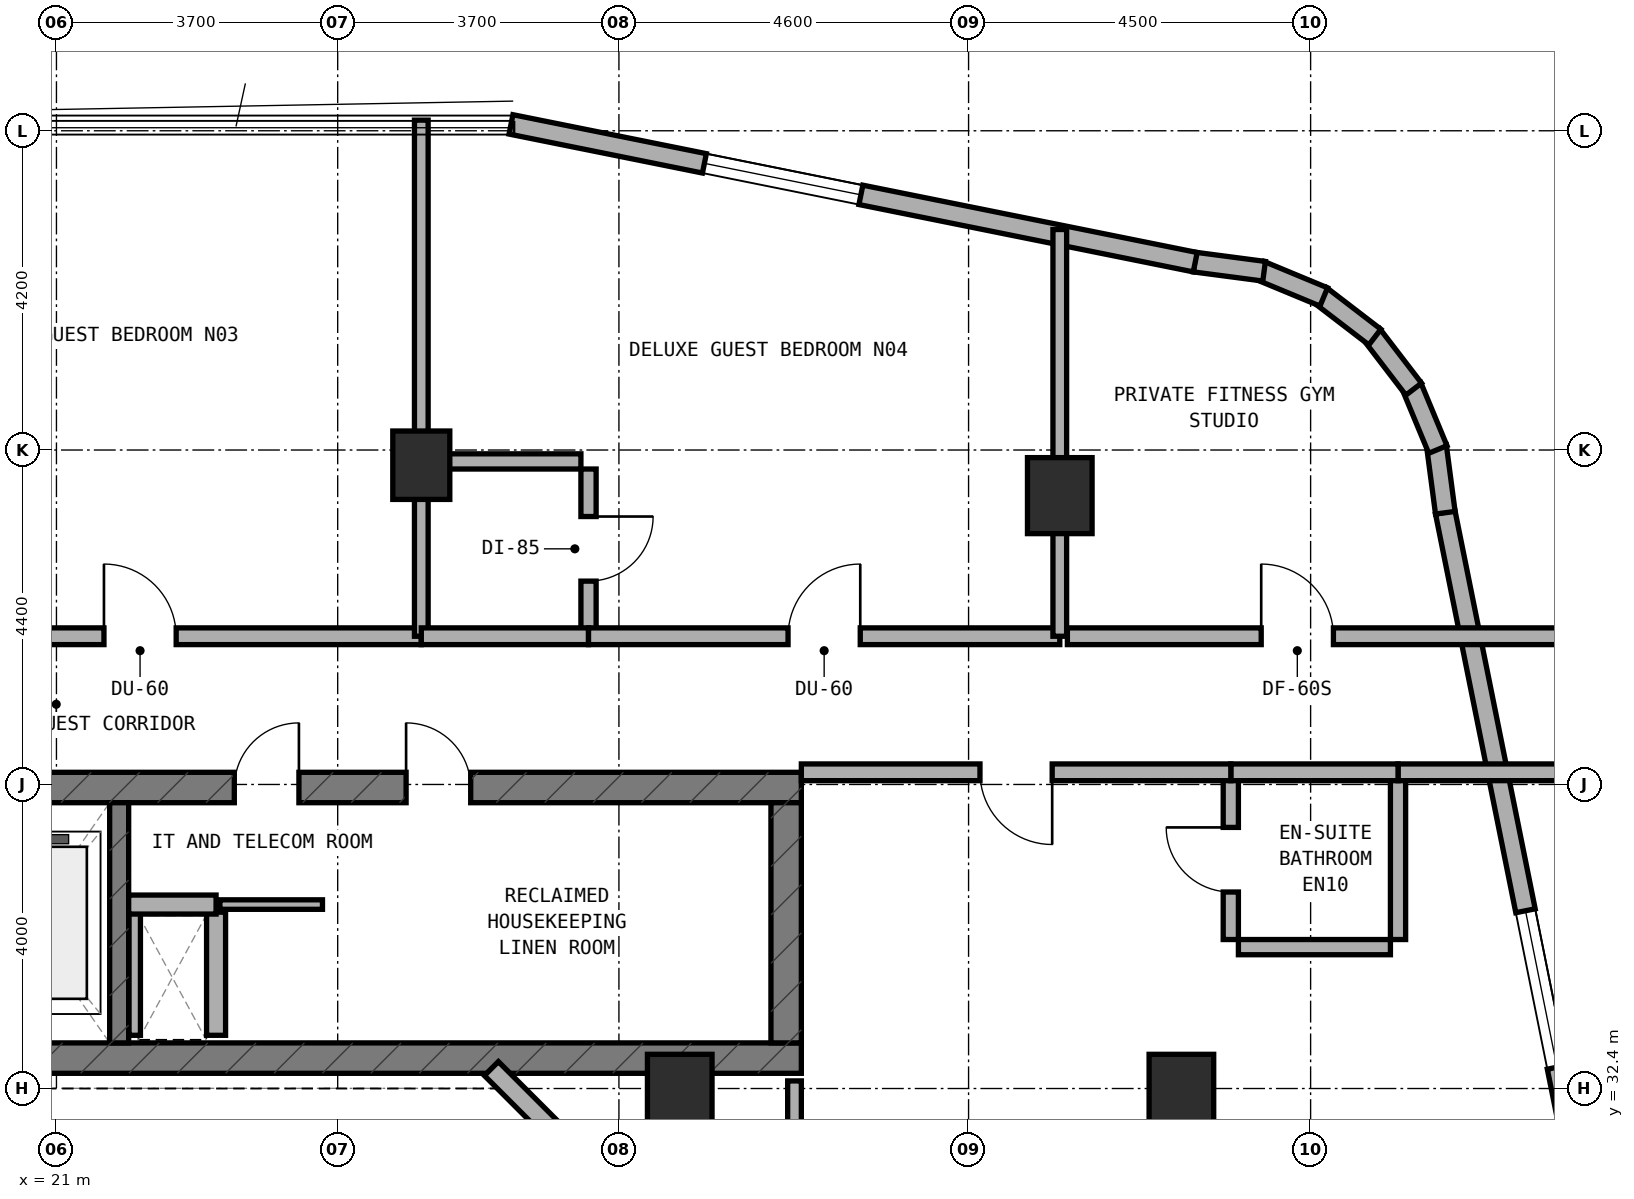
"""IFC4 building model, lengths in metres.
Left out: names, types, materials, properties, quantities, classifications, styles, units other than length and angle.
Written with IfcOpenShell. Run it as: python <this file> out.ifc"""

import sys

from ifc_helpers import new_model, si_unit, direction, frame, frame_2d, origin, origin_2d, place, context, subcontext, project, spatial, rectangle, extrude, element, fill, save


model = new_model("IFC4")
c1 = context("Model", 3, precision=1e-05, world=origin(), true_north=direction((0.0, 1.0)))
c2 = subcontext(c1, "Body", "Model", "MODEL_VIEW")
j1 = project(units=[si_unit("LENGTHUNIT", "METRE"), si_unit("PLANEANGLEUNIT", "RADIAN")], contexts=[c1])
p1 = place(None, origin())
s1 = spatial("IfcSite", under=j1, at=p1, CompositionType="ELEMENT")
p2 = place(p1, origin())
s2 = spatial("IfcBuilding", under=s1, at=p2, CompositionType="ELEMENT")
p3 = place(p2, frame((0.0, 0.0, 152.0)))
s3 = spatial("IfcBuildingStorey", under=s2, at=p3, CompositionType="ELEMENT", Elevation=152.0)
p4 = place(p3, frame((6.4, 32.8, 0.0), z_axis=(0.0, 0.0, 1.0), x_axis=(1.0, 0.0, 0.0)))
e1 = element("IfcWall", 1, at=p4, inside=s3, PredefinedType="SHEAR", context=c2, shape_type="SweptSolid", body=[
    extrude(rectangle(XDim=24.4, YDim=0.4, at=frame_2d((12.2, 0.0))), origin(), (0.0, 0.0, 1.0), 3.5),
])
p5 = place(p4, frame((6.05, 0.0, 0.0)))
e2 = element("IfcOpeningElement", 2, at=p5, cuts=e1, PredefinedType="OPENING", context=c2, shape_type="SweptSolid", body=[
    extrude(rectangle(XDim=1.1, YDim=2.15, at=frame_2d((0.55, 1.075))), frame((0.0, 0.21, 0.0), z_axis=(0.0, -1.0, 0.0), x_axis=(1.0, 0.0, 0.0)), (0.0, 0.0, 1.0), 0.42),
])
p6 = place(p3, frame((6.4, 36.36, 0.0), z_axis=(0.0, 0.0, 1.0), x_axis=(1.0, 0.0, 0.0)))
e3 = element("IfcWall", 3, at=p6, inside=s3, PredefinedType="SHEAR", context=c2, shape_type="SweptSolid", body=[
    extrude(rectangle(XDim=24.4, YDim=0.4, at=frame_2d((12.2, 0.0))), origin(), (0.0, 0.0, 1.0), 3.5),
])
p7 = place(p6, frame((9.15, 0.0, 0.0)))
e4 = element("IfcOpeningElement", 4, at=p7, cuts=e3, PredefinedType="OPENING", context=c2, shape_type="SweptSolid", body=[
    extrude(rectangle(XDim=1.2, YDim=2.15, at=frame_2d((0.6, 1.075))), frame((0.0, 0.21, 0.0), z_axis=(0.0, -1.0, 0.0), x_axis=(1.0, 0.0, 0.0)), (0.0, 0.0, 1.0), 0.42),
])
p8 = place(p6, frame((19.2, 0.0, 0.0)))
e5 = element("IfcOpeningElement", 5, at=p8, cuts=e3, PredefinedType="OPENING", context=c2, shape_type="SweptSolid", body=[
    extrude(rectangle(XDim=0.85, YDim=2.1, at=frame_2d((0.425, 1.05))), frame((0.0, 0.21, 0.0), z_axis=(0.0, -1.0, 0.0), x_axis=(1.0, 0.0, 0.0)), (0.0, 0.0, 1.0), 0.42),
])
p9 = place(p6, frame((16.94, 0.0, 0.0)))
e6 = element("IfcOpeningElement", 6, at=p9, cuts=e3, PredefinedType="OPENING", context=c2, shape_type="SweptSolid", body=[
    extrude(rectangle(XDim=0.85, YDim=2.1, at=frame_2d((0.425, 1.05))), frame((0.0, 0.21, 0.0), z_axis=(0.0, -1.0, 0.0), x_axis=(1.0, 0.0, 0.0)), (0.0, 0.0, 1.0), 0.42),
])
p10 = place(p3, frame((30.6, 33.0, 0.0), z_axis=(0.0, 0.0, 1.0), x_axis=(0.0, 1.0, 0.0)))
e7 = element("IfcWall", 7, at=p10, inside=s3, PredefinedType="SHEAR", context=c2, shape_type="SweptSolid", body=[
    extrude(rectangle(XDim=3.16, YDim=0.4, at=frame_2d((1.58, 0.0))), origin(), (0.0, 0.0, 1.0), 3.5),
])
p11 = place(p3, frame((21.825, 33.0, 0.0), z_axis=(0.0, 0.0, 1.0), x_axis=(0.0, 1.0, 0.0)))
e8 = element("IfcWall", 8, at=p11, inside=s3, PredefinedType="STANDARD", context=c2, shape_type="SweptSolid", body=[
    extrude(rectangle(XDim=3.16, YDim=0.25, at=frame_2d((1.58, 0.0))), origin(), (0.0, 0.0, 1.0), 3.22),
])
p12 = place(p3, frame((25.8, 40.6, 0.0), z_axis=(0.0, 0.0, 1.0), x_axis=(1.0, 0.0, 0.0)))
e9 = element("IfcColumn", 9, at=p12, inside=s3, PredefinedType="COLUMN", context=c2, shape_type="SweptSolid", body=[
    extrude(rectangle(XDim=0.75, YDim=0.9, at=origin_2d()), origin(), (0.0, 0.0, 1.0), 3.5),
])
for number, where, z_axis, x_axis in (
    (10, (34.2, 40.2, 0.0), (0.0, 0.0, 1.0), (1.0, 0.0, 0.0)),
    (11, (35.8, 32.35, 0.0), (0.0, 0.0, 1.0), (1.0, 0.0, 0.0)),
    (12, (29.2, 32.35, 0.0), (0.0, 0.0, 1.0), (1.0, 0.0, 0.0)),
):
    element("IfcColumn", number, at=place(p3, frame(where, z_axis=z_axis, x_axis=x_axis)), inside=s3, PredefinedType="COLUMN", context=c2, shape_type="SweptSolid", body=[
        extrude(rectangle(XDim=0.85, YDim=1.0, at=origin_2d()), origin(), (0.0, 0.0, 1.0), 3.5),
    ])
p13 = place(p3, frame((41.084, 30.98, 0.0), z_axis=(0.0, 0.0, 1.0), x_axis=(-0.197435082048, 0.980315963543, 0.0)))
e13 = element("IfcWall", 13, at=p13, inside=s3, PredefinedType="STANDARD", context=c2, shape_type="SweptSolid", body=[
    extrude(rectangle(XDim=9.183, YDim=0.26, at=frame_2d((4.591, 0.0))), origin(), (0.0, 0.0, 1.0), 3.22),
])
p14 = place(p13, frame((1.734, 0.0, 0.85)))
e14 = element("IfcOpeningElement", 14, at=p14, cuts=e13, PredefinedType="OPENING", context=c2, shape_type="SweptSolid", body=[
    extrude(rectangle(XDim=2.1, YDim=1.5, at=frame_2d((1.05, 0.75))), frame((0.0, 0.14, 0.0), z_axis=(0.0, -1.0, 0.0), x_axis=(1.0, 0.0, 0.0)), (0.0, 0.0, 1.0), 0.28),
])
p15 = place(p3, frame((39.272, 39.975, 0.0), z_axis=(0.0, 0.0, 1.0), x_axis=(-0.130953706898, 0.991388484223, 0.0)))
e15 = element("IfcWall", 15, at=p15, inside=s3, PredefinedType="STANDARD", context=c2, shape_type="SweptSolid", body=[
    extrude(rectangle(XDim=0.885, YDim=0.26, at=frame_2d((0.443, 0.0))), origin(), (0.0, 0.0, 1.0), 3.22),
])
p16 = place(p3, frame((39.174, 40.807, 0.0), z_axis=(0.0, 0.0, 1.0), x_axis=(-0.383290660547, 0.923627776508, 0.0)))
e16 = element("IfcWall", 16, at=p16, inside=s3, PredefinedType="STANDARD", context=c2, shape_type="SweptSolid", body=[
    extrude(rectangle(XDim=0.903, YDim=0.26, at=frame_2d((0.452, 0.0))), origin(), (0.0, 0.0, 1.0), 3.22),
])
p17 = place(p3, frame((38.856, 41.601, 0.0), z_axis=(0.0, 0.0, 1.0), x_axis=(-0.608624690463, 0.793458244748, 0.0)))
e17 = element("IfcWall", 17, at=p17, inside=s3, PredefinedType="STANDARD", context=c2, shape_type="SweptSolid", body=[
    extrude(rectangle(XDim=0.902, YDim=0.26, at=frame_2d((0.451, 0.0))), origin(), (0.0, 0.0, 1.0), 3.22),
])
p18 = place(p3, frame((38.345, 42.286, 0.0), z_axis=(0.0, 0.0, 1.0), x_axis=(-0.793558456666, 0.608494022858, 0.0)))
e18 = element("IfcWall", 18, at=p18, inside=s3, PredefinedType="STANDARD", context=c2, shape_type="SweptSolid", body=[
    extrude(rectangle(XDim=0.902, YDim=0.26, at=frame_2d((0.451, 0.0))), origin(), (0.0, 0.0, 1.0), 3.22),
])
p19 = place(p3, frame((37.673, 42.814, 0.0), z_axis=(0.0, 0.0, 1.0), x_axis=(-0.923683767999, 0.383155708213, 0.0)))
e19 = element("IfcWall", 19, at=p19, inside=s3, PredefinedType="STANDARD", context=c2, shape_type="SweptSolid", body=[
    extrude(rectangle(XDim=0.903, YDim=0.26, at=frame_2d((0.451, 0.0))), origin(), (0.0, 0.0, 1.0), 3.22),
])
p20 = place(p3, frame((36.888, 43.152, 0.0), z_axis=(0.0, 0.0, 1.0), x_axis=(-0.991487658083, 0.130200706103, 0.0)))
e20 = element("IfcWall", 20, at=p20, inside=s3, PredefinedType="STANDARD", context=c2, shape_type="SweptSolid", body=[
    extrude(rectangle(XDim=0.921, YDim=0.26, at=frame_2d((0.46, 0.0))), origin(), (0.0, 0.0, 1.0), 3.22),
])
p21 = place(p3, frame((35.982, 43.271, 0.0), z_axis=(0.0, 0.0, 1.0), x_axis=(-0.980315963543, 0.197435082048, 0.0)))
e21 = element("IfcWall", 21, at=p21, inside=s3, PredefinedType="STANDARD", context=c2, shape_type="SweptSolid", body=[
    extrude(rectangle(XDim=9.183, YDim=0.26, at=frame_2d((4.591, 0.0))), origin(), (0.0, 0.0, 1.0), 3.22),
])
p22 = place(p21, frame((4.487, 0.0, 0.85)))
e22 = element("IfcOpeningElement", 22, at=p22, cuts=e21, PredefinedType="OPENING", context=c2, shape_type="SweptSolid", body=[
    extrude(rectangle(XDim=2.1, YDim=1.5, at=frame_2d((1.05, 0.75))), frame((0.0, 0.14, 0.0), z_axis=(0.0, -1.0, 0.0), x_axis=(1.0, 0.0, 0.0)), (0.0, 0.0, 1.0), 0.28),
])
p23 = place(p3, frame((28.556, 30.828, 0.0), z_axis=(0.0, 0.0, 1.0), x_axis=(-0.707059717605, 0.707153841636, 0.0)))
e23 = element("IfcWall", 23, at=p23, inside=s3, PredefinedType="STANDARD", context=c2, shape_type="SweptSolid", body=[
    extrude(rectangle(XDim=2.594, YDim=0.26, at=frame_2d((1.297, 0.0))), origin(), (0.0, 0.0, 1.0), 3.22),
])
p24 = place(p3, frame((22.03, 33.1, 0.0), z_axis=(0.0, 0.0, 1.0), x_axis=(0.0, 1.0, 0.0)))
e24 = element("IfcWall", 24, at=p24, inside=s3, PredefinedType="PARTITIONING", context=c2, shape_type="SweptSolid", body=[
    extrude(rectangle(XDim=1.62, YDim=0.15, at=frame_2d((0.81, 0.0))), origin(), (0.0, 0.0, 1.0), 3.22),
])
p25 = place(p3, frame((23.1, 33.1, 0.0), z_axis=(0.0, 0.0, 1.0), x_axis=(0.0, 1.0, 0.0)))
e25 = element("IfcWall", 25, at=p25, inside=s3, PredefinedType="SOLIDWALL", context=c2, shape_type="SweptSolid", body=[
    extrude(rectangle(XDim=1.62, YDim=0.25, at=frame_2d((0.81, 0.0))), origin(), (0.0, 0.0, 1.0), 3.22),
])
p26 = place(p3, frame((21.95, 34.82, 0.0), z_axis=(0.0, 0.0, 1.0), x_axis=(1.0, 0.0, 0.0)))
e26 = element("IfcWall", 26, at=p26, inside=s3, PredefinedType="SOLIDWALL", context=c2, shape_type="SweptSolid", body=[
    extrude(rectangle(XDim=1.15, YDim=0.25, at=frame_2d((0.575, 0.0))), origin(), (0.0, 0.0, 1.0), 3.22),
])
p27 = place(p3, frame((23.15, 34.82, 0.0), z_axis=(0.0, 0.0, 1.0), x_axis=(1.0, 0.0, 0.0)))
e27 = element("IfcWall", 27, at=p27, inside=s3, PredefinedType="PARTITIONING", context=c2, shape_type="SweptSolid", body=[
    extrude(rectangle(XDim=1.35, YDim=0.125, at=frame_2d((0.675, 0.0))), origin(), (0.0, 0.0, 1.0), 3.22),
])
p28 = place(p3, frame((18.4, 38.35, 0.0), z_axis=(0.0, 0.0, 1.0), x_axis=(1.0, 0.0, 0.0)))
e28 = element("IfcWall", 28, at=p28, inside=s3, PredefinedType="SOLIDWALL", context=c2, shape_type="SweptSolid", body=[
    extrude(rectangle(XDim=7.4, YDim=0.22, at=frame_2d((3.7, 0.0))), origin(), (0.0, 0.0, 1.0), 2.795),
])
p29 = place(p28, frame((3.225, 0.0, 0.0)))
e29 = element("IfcOpeningElement", 29, at=p29, cuts=e28, PredefinedType="OPENING", context=c2, shape_type="SweptSolid", body=[
    extrude(rectangle(XDim=0.95, YDim=2.1, at=frame_2d((0.475, 1.05))), frame((0.0, 0.12, 0.0), z_axis=(0.0, -1.0, 0.0), x_axis=(1.0, 0.0, 0.0)), (0.0, 0.0, 1.0), 0.24),
])
p30 = place(p3, frame((25.8, 38.35, 0.0), z_axis=(0.0, 0.0, 1.0), x_axis=(0.0, 1.0, 0.0)))
e30 = element("IfcWall", 30, at=p30, inside=s3, PredefinedType="SOLIDWALL", context=c2, shape_type="SweptSolid", body=[
    extrude(rectangle(XDim=6.79, YDim=0.18, at=frame_2d((3.395, 0.0))), origin(), (0.0, 0.0, 1.0), 2.795),
])
p31 = place(p3, frame((28.0, 38.45, 0.0), z_axis=(0.0, 0.0, 1.0), x_axis=(0.0, 1.0, 0.0)))
e31 = element("IfcWall", 31, at=p31, inside=s3, PredefinedType="PLUMBINGWALL", context=c2, shape_type="SweptSolid", body=[
    extrude(rectangle(XDim=2.1, YDim=0.2, at=frame_2d((1.05, 0.0))), origin(), (0.0, 0.0, 1.0), 2.745),
])
p32 = place(p31, frame((0.625, 0.0, 0.0)))
e32 = element("IfcOpeningElement", 32, at=p32, cuts=e31, PredefinedType="OPENING", context=c2, shape_type="SweptSolid", body=[
    extrude(rectangle(XDim=0.85, YDim=2.1, at=frame_2d((0.425, 1.05))), frame((0.0, 0.11, 0.0), z_axis=(0.0, -1.0, 0.0), x_axis=(1.0, 0.0, 0.0)), (0.0, 0.0, 1.0), 0.22),
])
p33 = place(p3, frame((25.9, 40.65, 0.0), z_axis=(0.0, 0.0, 1.0), x_axis=(1.0, 0.0, 0.0)))
e33 = element("IfcWall", 33, at=p33, inside=s3, PredefinedType="PLUMBINGWALL", context=c2, shape_type="SweptSolid", body=[
    extrude(rectangle(XDim=2.0, YDim=0.2, at=frame_2d((1.0, 0.0))), origin(), (0.0, 0.0, 1.0), 2.835),
])
p34 = place(p3, frame((25.8, 38.35, 0.0), z_axis=(0.0, 0.0, 1.0), x_axis=(1.0, 0.0, 0.0)))
e34 = element("IfcWall", 34, at=p34, inside=s3, PredefinedType="SOLIDWALL", context=c2, shape_type="SweptSolid", body=[
    extrude(rectangle(XDim=2.2, YDim=0.22, at=frame_2d((1.1, 0.0))), origin(), (0.0, 0.0, 1.0), 2.795),
])
p35 = place(p3, frame((28.0, 38.35, 0.0), z_axis=(0.0, 0.0, 1.0), x_axis=(1.0, 0.0, 0.0)))
e35 = element("IfcWall", 35, at=p35, inside=s3, PredefinedType="SOLIDWALL", context=c2, shape_type="SweptSolid", body=[
    extrude(rectangle(XDim=6.2, YDim=0.22, at=frame_2d((3.1, 0.0))), origin(), (0.0, 0.0, 1.0), 2.795),
])
p36 = place(p35, frame((2.625, 0.0, 0.0)))
e36 = element("IfcOpeningElement", 36, at=p36, cuts=e35, PredefinedType="OPENING", context=c2, shape_type="SweptSolid", body=[
    extrude(rectangle(XDim=0.95, YDim=2.1, at=frame_2d((0.475, 1.05))), frame((0.0, 0.12, 0.0), z_axis=(0.0, -1.0, 0.0), x_axis=(1.0, 0.0, 0.0)), (0.0, 0.0, 1.0), 0.24),
])
p37 = place(p3, frame((34.2, 38.35, 0.0), z_axis=(0.0, 0.0, 1.0), x_axis=(0.0, 1.0, 0.0)))
e37 = element("IfcWall", 37, at=p37, inside=s3, PredefinedType="SOLIDWALL", context=c2, shape_type="SweptSolid", body=[
    extrude(rectangle(XDim=5.351, YDim=0.18, at=frame_2d((2.675, 0.0))), origin(), (0.0, 0.0, 1.0), 2.795),
])
p38 = place(p3, frame((34.3, 38.35, 0.0), z_axis=(0.0, 0.0, 1.0), x_axis=(1.0, 0.0, 0.0)))
e38 = element("IfcWall", 38, at=p38, inside=s3, PredefinedType="SOLIDWALL", context=c2, shape_type="SweptSolid", body=[
    extrude(rectangle(XDim=6.64, YDim=0.22, at=frame_2d((3.32, 0.0))), origin(), (0.0, 0.0, 1.0), 2.835),
])
p39 = place(p38, frame((2.55, 0.0, 0.0)))
e39 = element("IfcOpeningElement", 39, at=p39, cuts=e38, PredefinedType="OPENING", context=c2, shape_type="SweptSolid", body=[
    extrude(rectangle(XDim=0.95, YDim=2.1, at=frame_2d((0.475, 1.05))), frame((0.0, 0.12, 0.0), z_axis=(0.0, -1.0, 0.0), x_axis=(1.0, 0.0, 0.0)), (0.0, 0.0, 1.0), 0.24),
])
p40 = place(p3, frame((30.71, 17.5, 0.0), z_axis=(0.0, 0.0, 1.0), x_axis=(0.0, 1.0, 0.0)))
e40 = element("IfcWall", 40, at=p40, inside=s3, PredefinedType="SOLIDWALL", context=c2, shape_type="SweptSolid", body=[
    extrude(rectangle(XDim=15.0, YDim=0.18, at=frame_2d((7.5, 0.0))), origin(), (0.0, 0.0, 1.0), 2.795),
])
p41 = place(p3, frame((36.45, 34.36, 0.0), z_axis=(0.0, 0.0, 1.0), x_axis=(0.0, 1.0, 0.0)))
e41 = element("IfcWall", 41, at=p41, inside=s3, PredefinedType="PLUMBINGWALL", context=c2, shape_type="SweptSolid", body=[
    extrude(rectangle(XDim=2.1, YDim=0.2, at=frame_2d((1.05, 0.0))), origin(), (0.0, 0.0, 1.0), 3.22),
])
p42 = place(p41, frame((0.625, 0.0, 0.0)))
e42 = element("IfcOpeningElement", 42, at=p42, cuts=e41, PredefinedType="OPENING", context=c2, shape_type="SweptSolid", body=[
    extrude(rectangle(XDim=0.85, YDim=2.1, at=frame_2d((0.425, 1.05))), frame((0.0, 0.11, 0.0), z_axis=(0.0, -1.0, 0.0), x_axis=(1.0, 0.0, 0.0)), (0.0, 0.0, 1.0), 0.22),
])
p43 = place(p3, frame((36.55, 34.26, 0.0), z_axis=(0.0, 0.0, 1.0), x_axis=(1.0, 0.0, 0.0)))
e43 = element("IfcWall", 43, at=p43, inside=s3, PredefinedType="PLUMBINGWALL", context=c2, shape_type="SweptSolid", body=[
    extrude(rectangle(XDim=2.0, YDim=0.2, at=frame_2d((1.0, 0.0))), origin(), (0.0, 0.0, 1.0), 3.22),
])
p44 = place(p3, frame((38.65, 34.36, 0.0), z_axis=(0.0, 0.0, 1.0), x_axis=(0.0, 1.0, 0.0)))
e44 = element("IfcWall", 44, at=p44, inside=s3, PredefinedType="PLUMBINGWALL", context=c2, shape_type="SweptSolid", body=[
    extrude(rectangle(XDim=2.1, YDim=0.2, at=frame_2d((1.05, 0.0))), origin(), (0.0, 0.0, 1.0), 3.22),
])
p45 = place(p3, frame((38.65, 36.56, 0.0), z_axis=(0.0, 0.0, 1.0), x_axis=(1.0, 0.0, 0.0)))
e45 = element("IfcWall", 45, at=p45, inside=s3, PredefinedType="SOLIDWALL", context=c2, shape_type="SweptSolid", body=[
    extrude(rectangle(XDim=2.55, YDim=0.22, at=frame_2d((1.275, 0.0))), origin(), (0.0, 0.0, 1.0), 3.22),
])
p46 = place(p3, frame((36.45, 36.56, 0.0), z_axis=(0.0, 0.0, 1.0), x_axis=(1.0, 0.0, 0.0)))
e46 = element("IfcWall", 46, at=p46, inside=s3, PredefinedType="SOLIDWALL", context=c2, shape_type="SweptSolid", body=[
    extrude(rectangle(XDim=2.2, YDim=0.22, at=frame_2d((1.1, 0.0))), origin(), (0.0, 0.0, 1.0), 3.22),
])
p47 = place(p3, frame((30.8, 36.56, 0.0), z_axis=(0.0, 0.0, 1.0), x_axis=(1.0, 0.0, 0.0)))
e47 = element("IfcWall", 47, at=p47, inside=s3, PredefinedType="SOLIDWALL", context=c2, shape_type="SweptSolid", body=[
    extrude(rectangle(XDim=5.65, YDim=0.22, at=frame_2d((2.825, 0.0))), origin(), (0.0, 0.0, 1.0), 2.795),
])
p48 = place(p47, frame((2.35, 0.0, 0.0)))
e48 = element("IfcOpeningElement", 48, at=p48, cuts=e47, PredefinedType="OPENING", context=c2, shape_type="SweptSolid", body=[
    extrude(rectangle(XDim=0.95, YDim=2.1, at=frame_2d((0.475, 1.05))), frame((0.0, 0.12, 0.0), z_axis=(0.0, -1.0, 0.0), x_axis=(1.0, 0.0, 0.0)), (0.0, 0.0, 1.0), 0.24),
])
p49 = place(p14, origin())
e49 = element("IfcWindow", 49, at=p49, inside=s3, PartitioningType="SINGLE_PANEL", PredefinedType="WINDOW", context=c2, shape_type="SweptSolid", body=[
    extrude(rectangle(XDim=2.1, YDim=1.5, at=frame_2d((1.05, 0.75))), frame((0.0, 0.03, 0.0), z_axis=(0.0, -1.0, 0.0), x_axis=(1.0, 0.0, 0.0)), (0.0, 0.0, 1.0), 0.06),
])
fill(e14, e49)
p50 = place(p22, origin())
e50 = element("IfcWindow", 50, at=p50, inside=s3, PartitioningType="SINGLE_PANEL", PredefinedType="WINDOW", context=c2, shape_type="SweptSolid", body=[
    extrude(rectangle(XDim=2.1, YDim=1.5, at=frame_2d((1.05, 0.75))), frame((0.0, 0.03, 0.0), z_axis=(0.0, -1.0, 0.0), x_axis=(1.0, 0.0, 0.0)), (0.0, 0.0, 1.0), 0.06),
])
fill(e22, e50)
p51 = place(p8, origin())
e51 = element("IfcDoor", 51, at=p51, inside=s3, OperationType="SINGLE_SWING_LEFT", PredefinedType="DOOR", context=c2, shape_type="SweptSolid", body=[
    extrude(rectangle(XDim=0.85, YDim=2.1, at=frame_2d((0.425, 1.05))), frame((0.0, 0.025, 0.0), z_axis=(0.0, -1.0, 0.0), x_axis=(1.0, 0.0, 0.0)), (0.0, 0.0, 1.0), 0.05),
])
fill(e5, e51)
p52 = place(p9, origin())
e52 = element("IfcDoor", 52, at=p52, inside=s3, OperationType="SINGLE_SWING_RIGHT", PredefinedType="DOOR", context=c2, shape_type="SweptSolid", body=[
    extrude(rectangle(XDim=0.85, YDim=2.1, at=frame_2d((0.425, 1.05))), frame((0.0, 0.025, 0.0), z_axis=(0.0, -1.0, 0.0), x_axis=(1.0, 0.0, 0.0)), (0.0, 0.0, 1.0), 0.05),
])
fill(e6, e52)
p53 = place(p29, origin())
e53 = element("IfcDoor", 53, at=p53, inside=s3, OperationType="SINGLE_SWING_LEFT", PredefinedType="DOOR", context=c2, shape_type="SweptSolid", body=[
    extrude(rectangle(XDim=0.95, YDim=2.1, at=frame_2d((0.475, 1.05))), frame((0.0, 0.025, 0.0), z_axis=(0.0, -1.0, 0.0), x_axis=(1.0, 0.0, 0.0)), (0.0, 0.0, 1.0), 0.05),
])
fill(e29, e53)
p54 = place(p32, frame((0.85, 0.0, 0.0), z_axis=(0.0, 0.0, 1.0), x_axis=(-1.0, 0.0, 0.0)))
e54 = element("IfcDoor", 54, at=p54, inside=s3, OperationType="SINGLE_SWING_LEFT", PredefinedType="DOOR", context=c2, shape_type="SweptSolid", body=[
    extrude(rectangle(XDim=0.85, YDim=2.1, at=frame_2d((0.425, 1.05))), frame((0.0, 0.025, 0.0), z_axis=(0.0, -1.0, 0.0), x_axis=(1.0, 0.0, 0.0)), (0.0, 0.0, 1.0), 0.05),
])
fill(e32, e54)
p55 = place(p36, origin())
e55 = element("IfcDoor", 55, at=p55, inside=s3, OperationType="SINGLE_SWING_RIGHT", PredefinedType="DOOR", context=c2, shape_type="SweptSolid", body=[
    extrude(rectangle(XDim=0.95, YDim=2.1, at=frame_2d((0.475, 1.05))), frame((0.0, 0.025, 0.0), z_axis=(0.0, -1.0, 0.0), x_axis=(1.0, 0.0, 0.0)), (0.0, 0.0, 1.0), 0.05),
])
fill(e36, e55)
p56 = place(p39, origin())
e56 = element("IfcDoor", 56, at=p56, inside=s3, OperationType="SINGLE_SWING_LEFT", PredefinedType="DOOR", context=c2, shape_type="SweptSolid", body=[
    extrude(rectangle(XDim=0.95, YDim=2.1, at=frame_2d((0.475, 1.05))), frame((0.0, 0.025, 0.0), z_axis=(0.0, -1.0, 0.0), x_axis=(1.0, 0.0, 0.0)), (0.0, 0.0, 1.0), 0.05),
])
fill(e39, e56)
p57 = place(p42, origin())
e57 = element("IfcDoor", 57, at=p57, inside=s3, OperationType="SINGLE_SWING_RIGHT", PredefinedType="DOOR", context=c2, shape_type="SweptSolid", body=[
    extrude(rectangle(XDim=0.85, YDim=2.1, at=frame_2d((0.425, 1.05))), frame((0.0, 0.025, 0.0), z_axis=(0.0, -1.0, 0.0), x_axis=(1.0, 0.0, 0.0)), (0.0, 0.0, 1.0), 0.05),
])
fill(e42, e57)
p58 = place(p48, frame((0.95, 0.0, 0.0), z_axis=(0.0, 0.0, 1.0), x_axis=(-1.0, 0.0, 0.0)))
e58 = element("IfcDoor", 58, at=p58, inside=s3, OperationType="SINGLE_SWING_LEFT", PredefinedType="DOOR", context=c2, shape_type="SweptSolid", body=[
    extrude(rectangle(XDim=0.95, YDim=2.1, at=frame_2d((0.475, 1.05))), frame((0.0, 0.025, 0.0), z_axis=(0.0, -1.0, 0.0), x_axis=(1.0, 0.0, 0.0)), (0.0, 0.0, 1.0), 0.05),
])
fill(e48, e58)
save(model, sys.argv[1])
